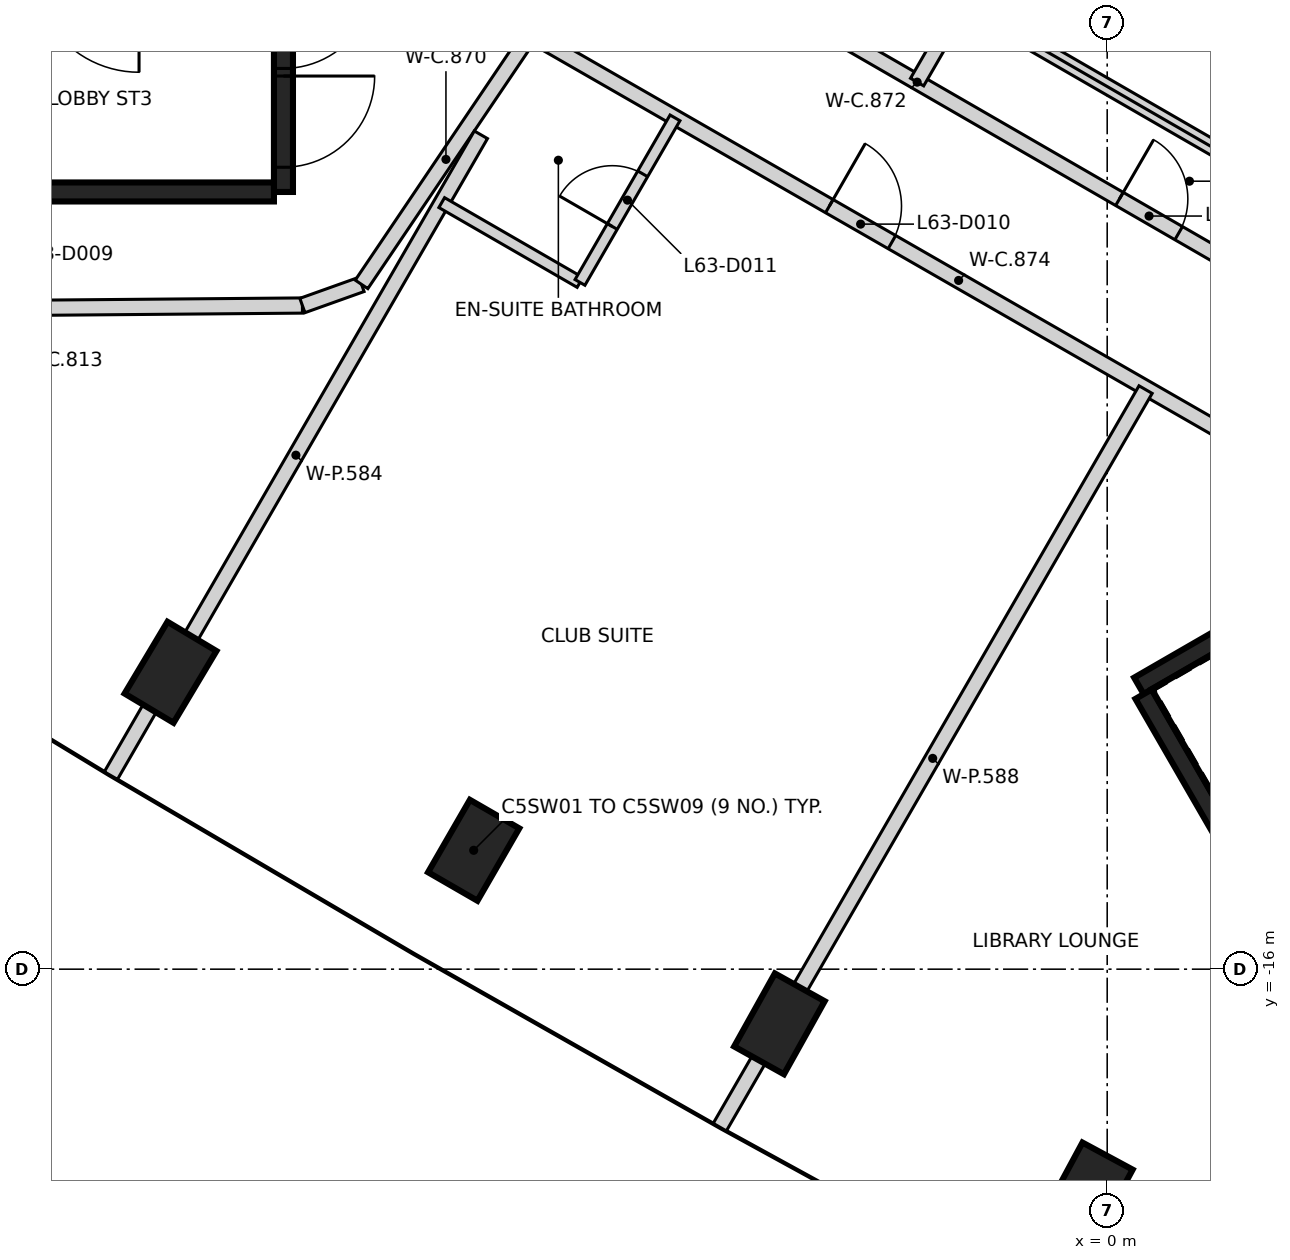
"""IFC4 building model, lengths in metres.
Left out: names, types, materials, properties, quantities, classifications, styles, units other than length and angle.
Written with IfcOpenShell. Run it as: python <this file> out.ifc"""

import sys

from ifc_helpers import new_model, si_unit, direction, frame, frame_2d, origin, origin_2d, place, context, subcontext, project, spatial, rectangle, extrude, element, fill, save


model = new_model("IFC4")
c1 = context("Model", 3, precision=1e-05, world=origin(), true_north=direction((0.0, 1.0)))
c2 = subcontext(c1, "Body", "Model", "MODEL_VIEW")
j1 = project(units=[si_unit("LENGTHUNIT", "METRE"), si_unit("PLANEANGLEUNIT", "RADIAN")], contexts=[c1])
p1 = place(None, origin())
s1 = spatial("IfcSite", under=j1, at=p1, CompositionType="ELEMENT")
p2 = place(p1, origin())
s2 = spatial("IfcBuilding", under=s1, at=p2, CompositionType="ELEMENT")
p3 = place(p2, frame((0.0, 0.0, 250.2)))
s3 = spatial("IfcBuildingStorey", under=s2, at=p3, CompositionType="ELEMENT", Elevation=250.2)
for number, where, z_axis, x_axis in (
    (1, (-12.323, -12.094, -0.35), (0.0, 0.0, 1.0), (0.513, 0.858, 0.0)),
    (2, (-8.335, -14.436, -0.35), (0.0, 0.0, 1.0), (0.5, 0.866, 0.0)),
    (3, (-4.312, -16.719, -0.35), (0.0, 0.0, 1.0), (0.487, 0.873, 0.0)),
    (4, (-0.256, -18.943, -0.35), (0.0, 0.0, 1.0), (0.475, 0.88, 0.0)),
):
    element("IfcColumn", number, at=place(p3, frame(where, z_axis=z_axis, x_axis=x_axis)), inside=s3, PredefinedType="COLUMN", context=c2, shape_type="SweptSolid", body=[
        extrude(rectangle(XDim=1.1, YDim=0.75, at=origin_2d()), origin(), (0.0, 0.0, 1.0), 3.6),
    ])
p4 = place(p3, frame((-10.837, 5.775, 0.0), z_axis=(0.0, 0.0, 1.0), x_axis=(0.0, -1.0, 0.0)))
e5 = element("IfcWall", 5, at=p4, inside=s3, PredefinedType="SHEAR", context=c2, shape_type="SweptSolid", body=[
    extrude(rectangle(XDim=11.55, YDim=0.25, at=frame_2d((5.775, 0.0))), origin(), (0.0, 0.0, 1.0), 3.25),
])
p5 = place(p4, frame((10.025, 0.0, 0.0)))
e6 = element("IfcOpeningElement", 6, at=p5, cuts=e5, PredefinedType="OPENING", context=c2, shape_type="SweptSolid", body=[
    extrude(rectangle(XDim=1.2, YDim=2.1, at=frame_2d((0.6, 1.05))), frame((0.0, 0.135, 0.0), z_axis=(0.0, -1.0, 0.0), x_axis=(1.0, 0.0, 0.0)), (0.0, 0.0, 1.0), 0.27),
])
p6 = place(p4, frame((8.725, 0.0, 0.0)))
e7 = element("IfcOpeningElement", 7, at=p6, cuts=e5, PredefinedType="OPENING", context=c2, shape_type="SweptSolid", body=[
    extrude(rectangle(XDim=1.2, YDim=2.1, at=frame_2d((0.6, 1.05))), frame((0.0, 0.135, 0.0), z_axis=(0.0, -1.0, 0.0), x_axis=(1.0, 0.0, 0.0)), (0.0, 0.0, 1.0), 0.27),
])
p7 = place(p3, frame((-10.963, -5.775, 0.0), z_axis=(0.0, 0.0, 1.0), x_axis=(-1.0, 0.0, 0.0)))
e8 = element("IfcWall", 8, at=p7, inside=s3, PredefinedType="SHEAR", context=c2, shape_type="SweptSolid", body=[
    extrude(rectangle(XDim=5.225, YDim=0.25, at=frame_2d((2.612, 0.0))), origin(), (0.0, 0.0, 1.0), 3.25),
])
p8 = place(p3, frame((0.417, -12.273, 0.0), z_axis=(0.0, 0.0, 1.0), x_axis=(0.866021906294, 0.500006057782, 0.0)))
e9 = element("IfcWall", 9, at=p8, inside=s3, PredefinedType="SHEAR", context=c2, shape_type="SweptSolid", body=[
    extrude(rectangle(XDim=11.55, YDim=0.25, at=frame_2d((5.775, 0.0))), origin(), (0.0, 0.0, 1.0), 3.25),
])
p9 = place(p8, frame((10.025, 0.0, 0.0)))
e10 = element("IfcOpeningElement", 10, at=p9, cuts=e9, PredefinedType="OPENING", context=c2, shape_type="SweptSolid", body=[
    extrude(rectangle(XDim=1.2, YDim=2.1, at=frame_2d((0.6, 1.05))), frame((0.0, 0.135, 0.0), z_axis=(0.0, -1.0, 0.0), x_axis=(1.0, 0.0, 0.0)), (0.0, 0.0, 1.0), 0.27),
])
p10 = place(p8, frame((8.725, 0.0, 0.0)))
e11 = element("IfcOpeningElement", 11, at=p10, cuts=e9, PredefinedType="OPENING", context=c2, shape_type="SweptSolid", body=[
    extrude(rectangle(XDim=1.2, YDim=2.1, at=frame_2d((0.6, 1.05))), frame((0.0, 0.135, 0.0), z_axis=(0.0, -1.0, 0.0), x_axis=(1.0, 0.0, 0.0)), (0.0, 0.0, 1.0), 0.27),
])
p11 = place(p3, frame((3.235, -17.153, 0.0), z_axis=(0.0, 0.0, 1.0), x_axis=(-0.500008851346, 0.866020293397, 0.0)))
e12 = element("IfcWall", 12, at=p11, inside=s3, PredefinedType="SHEAR", context=c2, shape_type="SweptSolid", body=[
    extrude(rectangle(XDim=5.51, YDim=0.25, at=frame_2d((2.755, 0.0))), origin(), (0.0, 0.0, 1.0), 3.25),
])
p12 = place(p3, frame((-19.15, -7.341, 0.0), z_axis=(0.0, 0.0, 1.0), x_axis=(0.999964623126, 0.008411450351, 0.0)))
e13 = element("IfcWall", 13, at=p12, inside=s3, PredefinedType="PARTITIONING", context=c2, shape_type="SweptSolid", body=[
    extrude(rectangle(XDim=8.562, YDim=0.2, at=frame_2d((4.281, 0.0))), origin(), (0.0, 0.0, 1.0), 3.25),
])
p13 = place(p12, frame((3.781, 0.0, 0.0)))
e14 = element("IfcOpeningElement", 14, at=p13, cuts=e13, PredefinedType="OPENING", context=c2, shape_type="SweptSolid", body=[
    extrude(rectangle(XDim=1.0, YDim=2.1, at=frame_2d((0.5, 1.05))), frame((0.0, 0.11, 0.0), z_axis=(0.0, -1.0, 0.0), x_axis=(1.0, 0.0, 0.0)), (0.0, 0.0, 1.0), 0.22),
])
p14 = place(p3, frame((-10.588, -7.269, 0.0), z_axis=(0.0, 0.0, 1.0), x_axis=(0.941634876095, 0.336635945974, 0.0)))
e15 = element("IfcWall", 15, at=p14, inside=s3, PredefinedType="PARTITIONING", context=c2, shape_type="SweptSolid", body=[
    extrude(rectangle(XDim=0.826, YDim=0.2, at=frame_2d((0.413, 0.0))), origin(), (0.0, 0.0, 1.0), 3.25),
])
p15 = place(p3, frame((-9.81, -6.991, 0.0), z_axis=(0.0, 0.0, 1.0), x_axis=(0.559616535009, 0.828751671941, 0.0)))
e16 = element("IfcWall", 16, at=p15, inside=s3, PredefinedType="PARTITIONING", context=c2, shape_type="SweptSolid", body=[
    extrude(rectangle(XDim=3.969, YDim=0.2, at=frame_2d((1.984, 0.0))), origin(), (0.0, 0.0, 1.0), 3.25),
])
p16 = place(p3, frame((-8.612, -0.801, 0.0), z_axis=(0.0, 0.0, 1.0), x_axis=(0.865998070783, -0.50004733916, 0.0)))
e17 = element("IfcWall", 17, at=p16, inside=s3, PredefinedType="PARTITIONING", context=c2, shape_type="SweptSolid", body=[
    extrude(rectangle(XDim=14.115, YDim=0.2, at=frame_2d((7.058, 0.0))), origin(), (0.0, 0.0, 1.0), 3.25),
])
p17 = place(p16, frame((3.085, 0.0, 0.0)))
e18 = element("IfcOpeningElement", 18, at=p17, cuts=e17, PredefinedType="OPENING", context=c2, shape_type="SweptSolid", body=[
    extrude(rectangle(XDim=0.9, YDim=2.1, at=frame_2d((0.45, 1.05))), frame((0.0, 0.11, 0.0), z_axis=(0.0, -1.0, 0.0), x_axis=(1.0, 0.0, 0.0)), (0.0, 0.0, 1.0), 0.22),
])
p18 = place(p16, frame((10.131, 0.0, 0.0)))
e19 = element("IfcOpeningElement", 19, at=p18, cuts=e17, PredefinedType="OPENING", context=c2, shape_type="SweptSolid", body=[
    extrude(rectangle(XDim=0.9, YDim=2.1, at=frame_2d((0.45, 1.05))), frame((0.0, 0.11, 0.0), z_axis=(0.0, -1.0, 0.0), x_axis=(1.0, 0.0, 0.0)), (0.0, 0.0, 1.0), 0.22),
])
p19 = place(p3, frame((-7.589, -3.702, 0.0), z_axis=(0.0, 0.0, 1.0), x_axis=(0.867107959402, -0.498120253293, 0.0)))
e20 = element("IfcWall", 20, at=p19, inside=s3, PredefinedType="PARTITIONING", context=c2, shape_type="SweptSolid", body=[
    extrude(rectangle(XDim=12.996, YDim=0.2, at=frame_2d((6.498, 0.0))), origin(), (0.0, 0.0, 1.0), 3.25),
])
p20 = place(p19, frame((4.536, 0.0, 0.0)))
e21 = element("IfcOpeningElement", 21, at=p20, cuts=e20, PredefinedType="OPENING", context=c2, shape_type="SweptSolid", body=[
    extrude(rectangle(XDim=0.95, YDim=2.1, at=frame_2d((0.475, 1.05))), frame((0.0, 0.11, 0.0), z_axis=(0.0, -1.0, 0.0), x_axis=(1.0, 0.0, 0.0)), (0.0, 0.0, 1.0), 0.22),
])
p21 = place(p19, frame((10.691, 0.0, 0.0)))
e22 = element("IfcOpeningElement", 22, at=p21, cuts=e20, PredefinedType="OPENING", context=c2, shape_type="SweptSolid", body=[
    extrude(rectangle(XDim=1.0, YDim=2.1, at=frame_2d((0.5, 1.05))), frame((0.0, 0.11, 0.0), z_axis=(0.0, -1.0, 0.0), x_axis=(1.0, 0.0, 0.0)), (0.0, 0.0, 1.0), 0.22),
])
p22 = place(p3, frame((-13.107, -13.453, 0.0), z_axis=(0.0, 0.0, 1.0), x_axis=(0.500058218288, 0.865991788831, 0.0)))
e23 = element("IfcWall", 23, at=p22, inside=s3, PredefinedType="PARTITIONING", context=c2, shape_type="SweptSolid", body=[
    extrude(rectangle(XDim=9.735, YDim=0.2, at=frame_2d((4.867, 0.0))), origin(), (0.0, 0.0, 1.0), 3.25),
])
p23 = place(p3, frame((-6.0, -0.924, 0.0), z_axis=(0.0, 0.0, 1.0), x_axis=(0.866012967051, -0.500021540435, 0.0)))
e24 = element("IfcWall", 24, at=p23, inside=s3, PredefinedType="PARTITIONING", context=c2, shape_type="SweptSolid", body=[
    extrude(rectangle(XDim=9.468, YDim=0.2, at=frame_2d((4.734, 0.0))), origin(), (0.0, 0.0, 1.0), 3.25),
])
p24 = place(p3, frame((-5.097, -18.078, 0.0), z_axis=(0.0, 0.0, 1.0), x_axis=(0.49996389635, 0.866046247233, 0.0)))
e25 = element("IfcWall", 25, at=p24, inside=s3, PredefinedType="PARTITIONING", context=c2, shape_type="SweptSolid", body=[
    extrude(rectangle(XDim=11.204, YDim=0.2, at=frame_2d((5.602, 0.0))), origin(), (0.0, 0.0, 1.0), 3.25),
])
p25 = place(p3, frame((-2.501, -4.329, 0.0), z_axis=(0.0, 0.0, 1.0), x_axis=(0.500209787201, 0.865904249203, 0.0)))
e26 = element("IfcWall", 26, at=p25, inside=s3, PredefinedType="PARTITIONING", context=c2, shape_type="SweptSolid", body=[
    extrude(rectangle(XDim=1.2, YDim=0.2, at=frame_2d((0.6, 0.0))), origin(), (0.0, 0.0, 1.0), 3.25),
])
p26 = place(p3, frame((-8.755, -5.915, 0.0), z_axis=(0.0, 0.0, 1.0), x_axis=(0.866038466041, -0.499977374825, 0.0)))
e27 = element("IfcWall", 27, at=p26, inside=s3, PredefinedType="PARTITIONING", context=c2, shape_type="SweptSolid", body=[
    extrude(rectangle(XDim=2.1, YDim=0.15, at=frame_2d((1.05, 0.0))), origin(), (0.0, 0.0, 1.0), 3.25),
])
p27 = place(p3, frame((-6.936, -6.965, 0.0), z_axis=(0.0, 0.0, 1.0), x_axis=(0.500004234368, 0.866022959057, 0.0)))
e28 = element("IfcWall", 28, at=p27, inside=s3, PredefinedType="PARTITIONING", context=c2, shape_type="SweptSolid", body=[
    extrude(rectangle(XDim=2.5, YDim=0.15, at=frame_2d((1.25, 0.0))), origin(), (0.0, 0.0, 1.0), 3.25),
])
p28 = place(p27, frame((0.85, 0.0, 0.0)))
e29 = element("IfcOpeningElement", 29, at=p28, cuts=e28, PredefinedType="OPENING", context=c2, shape_type="SweptSolid", body=[
    extrude(rectangle(XDim=0.8, YDim=2.1, at=frame_2d((0.4, 1.05))), frame((0.0, 0.085, 0.0), z_axis=(0.0, -1.0, 0.0), x_axis=(1.0, 0.0, 0.0)), (0.0, 0.0, 1.0), 0.17),
])
p29 = place(p5, origin())
e30 = element("IfcDoor", 30, at=p29, inside=s3, OperationType="SINGLE_SWING_LEFT", PredefinedType="DOOR", context=c2, shape_type="SweptSolid", body=[
    extrude(rectangle(XDim=1.2, YDim=2.1, at=frame_2d((0.6, 1.05))), frame((0.0, 0.025, 0.0), z_axis=(0.0, -1.0, 0.0), x_axis=(1.0, 0.0, 0.0)), (0.0, 0.0, 1.0), 0.05),
])
fill(e6, e30)
p30 = place(p6, origin())
e31 = element("IfcDoor", 31, at=p30, inside=s3, OperationType="SINGLE_SWING_RIGHT", PredefinedType="DOOR", context=c2, shape_type="SweptSolid", body=[
    extrude(rectangle(XDim=1.2, YDim=2.1, at=frame_2d((0.6, 1.05))), frame((0.0, 0.025, 0.0), z_axis=(0.0, -1.0, 0.0), x_axis=(1.0, 0.0, 0.0)), (0.0, 0.0, 1.0), 0.05),
])
fill(e7, e31)
p31 = place(p20, frame((0.95, 0.0, 0.0), z_axis=(0.0, 0.0, 1.0), x_axis=(-1.0, 0.0, 0.0)))
e32 = element("IfcDoor", 32, at=p31, inside=s3, OperationType="SINGLE_SWING_LEFT", PredefinedType="DOOR", context=c2, shape_type="SweptSolid", body=[
    extrude(rectangle(XDim=0.95, YDim=2.1, at=frame_2d((0.475, 1.05))), frame((0.0, 0.025, 0.0), z_axis=(0.0, -1.0, 0.0), x_axis=(1.0, 0.0, 0.0)), (0.0, 0.0, 1.0), 0.05),
])
fill(e21, e32)
p32 = place(p28, frame((0.8, 0.0, 0.0), z_axis=(0.0, 0.0, 1.0), x_axis=(-1.0, 0.0, 0.0)))
e33 = element("IfcDoor", 33, at=p32, inside=s3, OperationType="SINGLE_SWING_LEFT", PredefinedType="DOOR", context=c2, shape_type="SweptSolid", body=[
    extrude(rectangle(XDim=0.8, YDim=2.1, at=frame_2d((0.4, 1.05))), frame((0.0, 0.025, 0.0), z_axis=(0.0, -1.0, 0.0), x_axis=(1.0, 0.0, 0.0)), (0.0, 0.0, 1.0), 0.05),
])
fill(e29, e33)
p33 = place(p18, origin())
e34 = element("IfcDoor", 34, at=p33, inside=s3, OperationType="SINGLE_SWING_LEFT", PredefinedType="DOOR", context=c2, shape_type="SweptSolid", body=[
    extrude(rectangle(XDim=0.9, YDim=2.1, at=frame_2d((0.45, 1.05))), frame((0.0, 0.025, 0.0), z_axis=(0.0, -1.0, 0.0), x_axis=(1.0, 0.0, 0.0)), (0.0, 0.0, 1.0), 0.05),
])
fill(e19, e34)
save(model, sys.argv[1])
